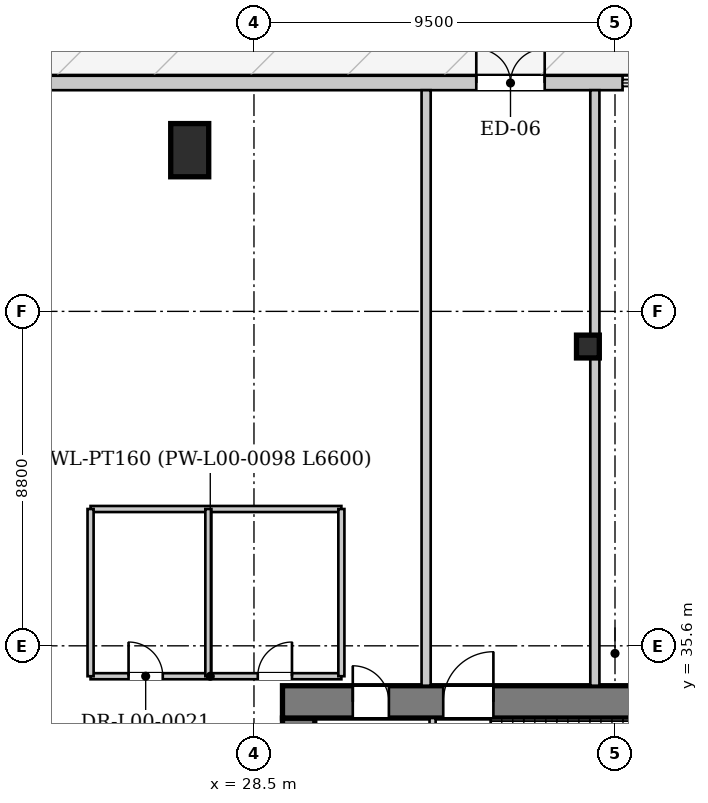
"""IFC4 building model, lengths in metres.
Left out: names, types, materials, properties, quantities, classifications, styles, units other than length and angle.
Written with IfcOpenShell. Run it as: python <this file> out.ifc"""

import sys

from ifc_helpers import new_model, si_unit, direction, frame, frame_2d, origin, origin_2d, place, context, subcontext, project, spatial, rectangle, hollow_rectangle, extrude, source, transform, mapped, element, fill, save


model = new_model("IFC4")
c1 = context("Model", 3, precision=1e-05, world=origin(), true_north=direction((0.0, 1.0)))
c2 = subcontext(c1, "Body", "Model", "MODEL_VIEW")
j1 = project(units=[si_unit("LENGTHUNIT", "METRE"), si_unit("PLANEANGLEUNIT", "RADIAN")], contexts=[c1])
p1 = place(None, origin())
s1 = spatial("IfcSite", under=j1, at=p1, CompositionType="ELEMENT")
p2 = place(p1, origin())
s2 = spatial("IfcBuilding", under=s1, at=p2, CompositionType="ELEMENT")
p3 = place(p2, origin())
s3 = spatial("IfcBuildingStorey", under=s2, at=p3, CompositionType="ELEMENT", Elevation=0.0)
m1 = source(origin(), c2, "Body", "SweptSolid", [
    extrude(rectangle(XDim=1.0, YDim=1.4, at=origin_2d()), origin(), (0.0, 0.0, 1.0), 5.235),
])
p4 = place(p3, frame((26.809, 48.642, 0.0), z_axis=(0.0, 0.0, 1.0), x_axis=(1.0, 0.0, 0.0)))
e1 = element("IfcColumn", 1, at=p4, inside=s3, PredefinedType="COLUMN", context=c2, shape_type="MappedRepresentation", body=[
    mapped(m1, transform((0.0, 0.0, 0.0), x_axis=(1.0, 0.0, 0.0), y_axis=(0.0, 1.0, 0.0), z_axis=(0.0, 0.0, 1.0), scale=1.0)),
])
m2 = source(origin(), c2, "Body", "SweptSolid", [
    extrude(hollow_rectangle(XDim=0.6, YDim=0.6, WallThickness=0.035, at=origin_2d()), origin(), (0.0, 0.0, 1.0), 5.235),
])
p5 = place(p3, frame((37.287, 43.475, 0.0), z_axis=(0.0, 0.0, 1.0), x_axis=(1.0, 0.0, 0.0)))
e2 = element("IfcColumn", 2, at=p5, inside=s3, PredefinedType="COLUMN", context=c2, shape_type="MappedRepresentation", body=[
    mapped(m2, transform((0.0, 0.0, 0.0), x_axis=(1.0, 0.0, 0.0), y_axis=(0.0, 1.0, 0.0), z_axis=(0.0, 0.0, 1.0), scale=1.0)),
])
p6 = place(p3, frame((2.0, 50.41, 0.0), z_axis=(0.0, 0.0, 1.0), x_axis=(1.0, 0.0, 0.0)))
e3 = element("IfcWall", 3, at=p6, inside=s3, PredefinedType="SOLIDWALL", context=c2, shape_type="SweptSolid", body=[
    extrude(rectangle(XDim=36.2, YDim=0.38, at=frame_2d((18.1, 0.0))), origin(), (0.0, 0.0, 1.0), 4.522),
])
p7 = place(p6, frame((1.2, 0.0, 0.0)))
e4 = element("IfcOpeningElement", 4, at=p7, cuts=e3, PredefinedType="OPENING", context=c2, shape_type="SweptSolid", body=[
    extrude(rectangle(XDim=5.1, YDim=4.2, at=frame_2d((2.55, 2.1))), frame((0.0, 0.2, 0.0), z_axis=(0.0, -1.0, 0.0), x_axis=(1.0, 0.0, 0.0)), (0.0, 0.0, 1.0), 0.4),
])
p8 = place(p6, frame((14.6, 0.0, 0.0)))
e5 = element("IfcOpeningElement", 5, at=p8, cuts=e3, PredefinedType="OPENING", context=c2, shape_type="SweptSolid", body=[
    extrude(rectangle(XDim=1.8, YDim=2.4, at=frame_2d((0.9, 1.2))), frame((0.0, 0.2, 0.0), z_axis=(0.0, -1.0, 0.0), x_axis=(1.0, 0.0, 0.0)), (0.0, 0.0, 1.0), 0.4),
])
p9 = place(p6, frame((32.35, 0.0, 0.0)))
e6 = element("IfcOpeningElement", 6, at=p9, cuts=e3, PredefinedType="OPENING", context=c2, shape_type="SweptSolid", body=[
    extrude(rectangle(XDim=1.8, YDim=2.4, at=frame_2d((0.9, 1.2))), frame((0.0, 0.2, 0.0), z_axis=(0.0, -1.0, 0.0), x_axis=(1.0, 0.0, 0.0)), (0.0, 0.0, 1.0), 0.4),
])
p10 = place(p6, frame((7.864, 0.0, 0.85)))
e7 = element("IfcOpeningElement", 7, at=p10, cuts=e3, PredefinedType="OPENING", context=c2, shape_type="SweptSolid", body=[
    extrude(rectangle(XDim=2.4, YDim=3.0, at=frame_2d((1.2, 1.5))), frame((0.0, 0.2, 0.0), z_axis=(0.0, -1.0, 0.0), x_axis=(1.0, 0.0, 0.0)), (0.0, 0.0, 1.0), 0.4),
])
p11 = place(p3, frame((29.675, 19.5, 0.0), z_axis=(0.0, 0.0, 1.0), x_axis=(0.0, 1.0, 0.0)))
e8 = element("IfcWall", 8, at=p11, inside=s3, PredefinedType="SHEAR", context=c2, shape_type="SweptSolid", body=[
    extrude(rectangle(XDim=14.2, YDim=0.85, at=frame_2d((7.1, 0.0))), origin(), (0.0, 0.0, 1.0), 5.08),
])
p12 = place(p11, frame((7.42, 0.0, 0.0)))
e9 = element("IfcOpeningElement", 9, at=p12, cuts=e8, PredefinedType="OPENING", context=c2, shape_type="SweptSolid", body=[
    extrude(rectangle(XDim=1.6, YDim=2.2, at=frame_2d((0.8, 1.1))), frame((0.0, 0.435, 0.0), z_axis=(0.0, -1.0, 0.0), x_axis=(1.0, 0.0, 0.0)), (0.0, 0.0, 1.0), 0.87),
])
p13 = place(p3, frame((29.25, 34.125, 0.0), z_axis=(0.0, 0.0, 1.0), x_axis=(1.0, 0.0, 0.0)))
e10 = element("IfcWall", 10, at=p13, inside=s3, PredefinedType="SHEAR", context=c2, shape_type="SweptSolid", body=[
    extrude(rectangle(XDim=17.5, YDim=0.85, at=frame_2d((8.75, 0.0))), origin(), (0.0, 0.0, 1.0), 5.08),
])
p14 = place(p13, frame((1.85, 0.0, 0.0)))
e11 = element("IfcOpeningElement", 11, at=p14, cuts=e10, PredefinedType="OPENING", context=c2, shape_type="SweptSolid", body=[
    extrude(rectangle(XDim=0.95, YDim=2.1, at=frame_2d((0.475, 1.05))), frame((0.0, 0.435, 0.0), z_axis=(0.0, -1.0, 0.0), x_axis=(1.0, 0.0, 0.0)), (0.0, 0.0, 1.0), 0.87),
])
p15 = place(p13, frame((4.23, 0.0, 0.0)))
e12 = element("IfcOpeningElement", 12, at=p15, cuts=e10, PredefinedType="OPENING", context=c2, shape_type="SweptSolid", body=[
    extrude(rectangle(XDim=1.32, YDim=2.2, at=frame_2d((0.66, 1.1))), frame((0.0, 0.435, 0.0), z_axis=(0.0, -1.0, 0.0), x_axis=(1.0, 0.0, 0.0)), (0.0, 0.0, 1.0), 0.87),
])
p16 = place(p13, frame((15.3, 0.0, 0.0)))
e13 = element("IfcOpeningElement", 13, at=p16, cuts=e10, PredefinedType="OPENING", context=c2, shape_type="SweptSolid", body=[
    extrude(rectangle(XDim=0.95, YDim=2.1, at=frame_2d((0.475, 1.05))), frame((0.0, 0.435, 0.0), z_axis=(0.0, -1.0, 0.0), x_axis=(1.0, 0.0, 0.0)), (0.0, 0.0, 1.0), 0.87),
])
p17 = place(p3, frame((33.2, 28.44, 0.0), z_axis=(0.0, 0.0, 1.0), x_axis=(0.0, 1.0, 0.0)))
e14 = element("IfcWall", 14, at=p17, inside=s3, PredefinedType="PARTITIONING", context=c2, shape_type="SweptSolid", body=[
    extrude(rectangle(XDim=5.26, YDim=0.16, at=frame_2d((2.63, 0.0))), origin(), (0.0, 0.0, 1.0), 5.08),
])
for number, where, z_axis, x_axis in (
    (15, (33.03, 34.55, 0.0), (0.0, 0.0, 1.0), (0.0, 1.0, 0.0)),
    (16, (37.47, 34.55, 0.0), (0.0, 0.0, 1.0), (0.0, 1.0, 0.0)),
):
    element("IfcWall", number, at=place(p3, frame(where, z_axis=z_axis, x_axis=x_axis)), inside=s3, PredefinedType="PARTITIONING", context=c2, shape_type="SweptSolid", body=[
        extrude(rectangle(XDim=15.67, YDim=0.24, at=frame_2d((7.835, 0.0))), origin(), (0.0, 0.0, 1.0), 4.43),
    ])
p18 = place(p3, frame((24.2, 34.8, 0.0), z_axis=(0.0, 0.0, 1.0), x_axis=(1.0, 0.0, 0.0)))
e17 = element("IfcWall", 17, at=p18, inside=s3, PredefinedType="PARTITIONING", context=c2, shape_type="SweptSolid", body=[
    extrude(rectangle(XDim=6.6, YDim=0.16, at=frame_2d((3.3, 0.0))), origin(), (0.0, 0.0, 1.0), 4.43),
])
p19 = place(p18, frame((1.0, 0.0, 0.0)))
e18 = element("IfcOpeningElement", 18, at=p19, cuts=e17, PredefinedType="OPENING", context=c2, shape_type="SweptSolid", body=[
    extrude(rectangle(XDim=0.9, YDim=2.1, at=frame_2d((0.45, 1.05))), frame((0.0, 0.09, 0.0), z_axis=(0.0, -1.0, 0.0), x_axis=(1.0, 0.0, 0.0)), (0.0, 0.0, 1.0), 0.18),
])
p20 = place(p18, frame((4.4, 0.0, 0.0)))
e19 = element("IfcOpeningElement", 19, at=p20, cuts=e17, PredefinedType="OPENING", context=c2, shape_type="SweptSolid", body=[
    extrude(rectangle(XDim=0.9, YDim=2.1, at=frame_2d((0.45, 1.05))), frame((0.0, 0.09, 0.0), z_axis=(0.0, -1.0, 0.0), x_axis=(1.0, 0.0, 0.0)), (0.0, 0.0, 1.0), 0.18),
])
p21 = place(p3, frame((24.2, 39.2, 0.0), z_axis=(0.0, 0.0, 1.0), x_axis=(1.0, 0.0, 0.0)))
e20 = element("IfcWall", 20, at=p21, inside=s3, PredefinedType="PARTITIONING", context=c2, shape_type="SweptSolid", body=[
    extrude(rectangle(XDim=6.6, YDim=0.16, at=frame_2d((3.3, 0.0))), origin(), (0.0, 0.0, 1.0), 4.43),
])
for number, where, z_axis, x_axis in (
    (21, (24.2, 34.8, 0.0), (0.0, 0.0, 1.0), (0.0, 1.0, 0.0)),
    (22, (27.3, 34.8, 0.0), (0.0, 0.0, 1.0), (0.0, 1.0, 0.0)),
    (23, (30.8, 34.8, 0.0), (0.0, 0.0, 1.0), (0.0, 1.0, 0.0)),
):
    element("IfcWall", number, at=place(p3, frame(where, z_axis=z_axis, x_axis=x_axis)), inside=s3, PredefinedType="PARTITIONING", context=c2, shape_type="SweptSolid", body=[
        extrude(rectangle(XDim=4.4, YDim=0.16, at=frame_2d((2.2, 0.0))), origin(), (0.0, 0.0, 1.0), 4.43),
    ])
m3 = source(origin(), c2, "Body", "SweptSolid", [
    extrude(rectangle(XDim=1.8, YDim=2.4, at=frame_2d((0.9, 1.2))), frame((0.0, 0.025, 0.0), z_axis=(0.0, -1.0, 0.0), x_axis=(1.0, 0.0, 0.0)), (0.0, 0.0, 1.0), 0.05),
])
p22 = place(p9, origin())
e24 = element("IfcDoor", 24, at=p22, inside=s3, OperationType="DOUBLE_DOOR_SINGLE_SWING", PredefinedType="DOOR", context=c2, shape_type="MappedRepresentation", body=[
    mapped(m3, transform((0.0, 0.0, 0.0), x_axis=(1.0, 0.0, 0.0), y_axis=(0.0, 1.0, 0.0), z_axis=(0.0, 0.0, 1.0), scale=1.0)),
])
fill(e6, e24)
m4 = source(origin(), c2, "Body", "SweptSolid", [
    extrude(rectangle(XDim=0.95, YDim=2.1, at=frame_2d((0.475, 1.05))), frame((0.0, 0.025, 0.0), z_axis=(0.0, -1.0, 0.0), x_axis=(1.0, 0.0, 0.0)), (0.0, 0.0, 1.0), 0.05),
])
p23 = place(p14, origin())
e25 = element("IfcDoor", 25, at=p23, inside=s3, OperationType="SINGLE_SWING_LEFT", PredefinedType="DOOR", context=c2, shape_type="MappedRepresentation", body=[
    mapped(m4, transform((0.0, 0.0, 0.0), x_axis=(1.0, 0.0, 0.0), y_axis=(0.0, 1.0, 0.0), z_axis=(0.0, 0.0, 1.0), scale=1.0)),
])
fill(e11, e25)
m5 = source(origin(), c2, "Body", "SweptSolid", [
    extrude(rectangle(XDim=1.32, YDim=2.2, at=frame_2d((0.66, 1.1))), frame((0.0, 0.025, 0.0), z_axis=(0.0, -1.0, 0.0), x_axis=(1.0, 0.0, 0.0)), (0.0, 0.0, 1.0), 0.05),
])
p24 = place(p15, origin())
e26 = element("IfcDoor", 26, at=p24, inside=s3, OperationType="SINGLE_SWING_RIGHT", PredefinedType="DOOR", context=c2, shape_type="MappedRepresentation", body=[
    mapped(m5, transform((0.0, 0.0, 0.0), x_axis=(1.0, 0.0, 0.0), y_axis=(0.0, 1.0, 0.0), z_axis=(0.0, 0.0, 1.0), scale=1.0)),
])
fill(e12, e26)
m6 = source(origin(), c2, "Body", "SweptSolid", [
    extrude(rectangle(XDim=0.9, YDim=2.1, at=frame_2d((0.45, 1.05))), frame((0.0, 0.025, 0.0), z_axis=(0.0, -1.0, 0.0), x_axis=(1.0, 0.0, 0.0)), (0.0, 0.0, 1.0), 0.05),
])
p25 = place(p19, origin())
e27 = element("IfcDoor", 27, at=p25, inside=s3, OperationType="SINGLE_SWING_LEFT", PredefinedType="DOOR", context=c2, shape_type="MappedRepresentation", body=[
    mapped(m6, transform((0.0, 0.0, 0.0), x_axis=(1.0, 0.0, 0.0), y_axis=(0.0, 1.0, 0.0), z_axis=(0.0, 0.0, 1.0), scale=1.0)),
])
fill(e18, e27)
p26 = place(p20, origin())
e28 = element("IfcDoor", 28, at=p26, inside=s3, OperationType="SINGLE_SWING_RIGHT", PredefinedType="DOOR", context=c2, shape_type="MappedRepresentation", body=[
    mapped(m6, transform((0.0, 0.0, 0.0), x_axis=(1.0, 0.0, 0.0), y_axis=(0.0, 1.0, 0.0), z_axis=(0.0, 0.0, 1.0), scale=1.0)),
])
fill(e19, e28)
save(model, sys.argv[1])
